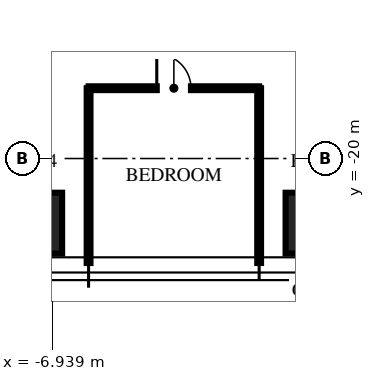
"""IFC4 building model, lengths in metres.
Left out: names, types, materials, properties, quantities, classifications, styles, units other than length and angle.
Written with IfcOpenShell. Run it as: python <this file> out.ifc"""

import sys

from ifc_helpers import new_model, si_unit, direction, frame, frame_2d, origin, origin_2d, place, context, subcontext, project, spatial, rectangle, extrude, element, fill, save


model = new_model("IFC4")
c1 = context("Model", 3, precision=1e-05, world=origin(), true_north=direction((0.0, 1.0)))
c2 = subcontext(c1, "Body", "Model", "MODEL_VIEW")
j1 = project(units=[si_unit("LENGTHUNIT", "METRE"), si_unit("PLANEANGLEUNIT", "RADIAN")], contexts=[c1])
p1 = place(None, origin())
s1 = spatial("IfcSite", under=j1, at=p1, CompositionType="ELEMENT")
p2 = place(p1, origin())
s2 = spatial("IfcBuilding", under=s1, at=p2, CompositionType="ELEMENT")
p3 = place(p2, frame((0.0, 0.0, 342.0)))
s3 = spatial("IfcBuildingStorey", under=s2, at=p3, CompositionType="ELEMENT", Elevation=342.0)
for number, where, z_axis, x_axis in (
    (1, (0.0, -21.7, 0.0), (0.0, 0.0, 1.0), (1.0, 0.0, 0.0)),
    (2, (-7.48, -21.7, 0.0), (0.0, 0.0, 1.0), (1.0, 0.0, 0.0)),
):
    element("IfcColumn", number, at=place(p3, frame(where, z_axis=z_axis, x_axis=x_axis)), inside=s3, PredefinedType="COLUMN", context=c2, shape_type="SweptSolid", body=[
        extrude(rectangle(XDim=1.6, YDim=1.6, at=origin_2d()), origin(), (0.0, 0.0, 1.0), 3.75),
    ])
for number, where, z_axis, x_axis in (
    (3, (-5.984, -18.15, 0.0), (0.0, 0.0, 1.0), (0.0, -1.0, 0.0)),
    (4, (-1.496, -18.15, 0.0), (0.0, 0.0, 1.0), (0.0, -1.0, 0.0)),
):
    element("IfcWall", number, at=place(p3, frame(where, z_axis=z_axis, x_axis=x_axis)), inside=s3, PredefinedType="PARTITIONING", context=c2, shape_type="SweptSolid", body=[
        extrude(rectangle(XDim=4.6, YDim=0.1, at=frame_2d((2.3, 0.0))), origin(), (0.0, 0.0, 1.0), 3.01),
    ])
p4 = place(p3, frame((-5.984, -18.15, 0.0), z_axis=(0.0, 0.0, 1.0), x_axis=(1.0, 0.0, 0.0)))
e5 = element("IfcWall", 5, at=p4, inside=s3, PredefinedType="PARTITIONING", context=c2, shape_type="SweptSolid", body=[
    extrude(rectangle(XDim=4.488, YDim=0.1, at=frame_2d((2.244, 0.0))), origin(), (0.0, 0.0, 1.0), 2.91),
])
p5 = place(p4, frame((1.794, 0.0, 0.0)))
e6 = element("IfcOpeningElement", 6, at=p5, cuts=e5, PredefinedType="OPENING", context=c2, shape_type="SweptSolid", body=[
    extrude(rectangle(XDim=0.9, YDim=2.1, at=frame_2d((0.45, 1.05))), frame((0.0, 0.06, 0.0), z_axis=(0.0, -1.0, 0.0), x_axis=(1.0, 0.0, 0.0)), (0.0, 0.0, 1.0), 0.12),
])
p6 = place(p5, origin())
e7 = element("IfcDoor", 7, at=p6, inside=s3, OperationType="SINGLE_SWING_LEFT", PredefinedType="DOOR", context=c2, shape_type="SweptSolid", body=[
    extrude(rectangle(XDim=0.9, YDim=2.1, at=frame_2d((0.45, 1.05))), frame((0.0, 0.025, 0.0), z_axis=(0.0, -1.0, 0.0), x_axis=(1.0, 0.0, 0.0)), (0.0, 0.0, 1.0), 0.05),
])
fill(e6, e7)
save(model, sys.argv[1])
